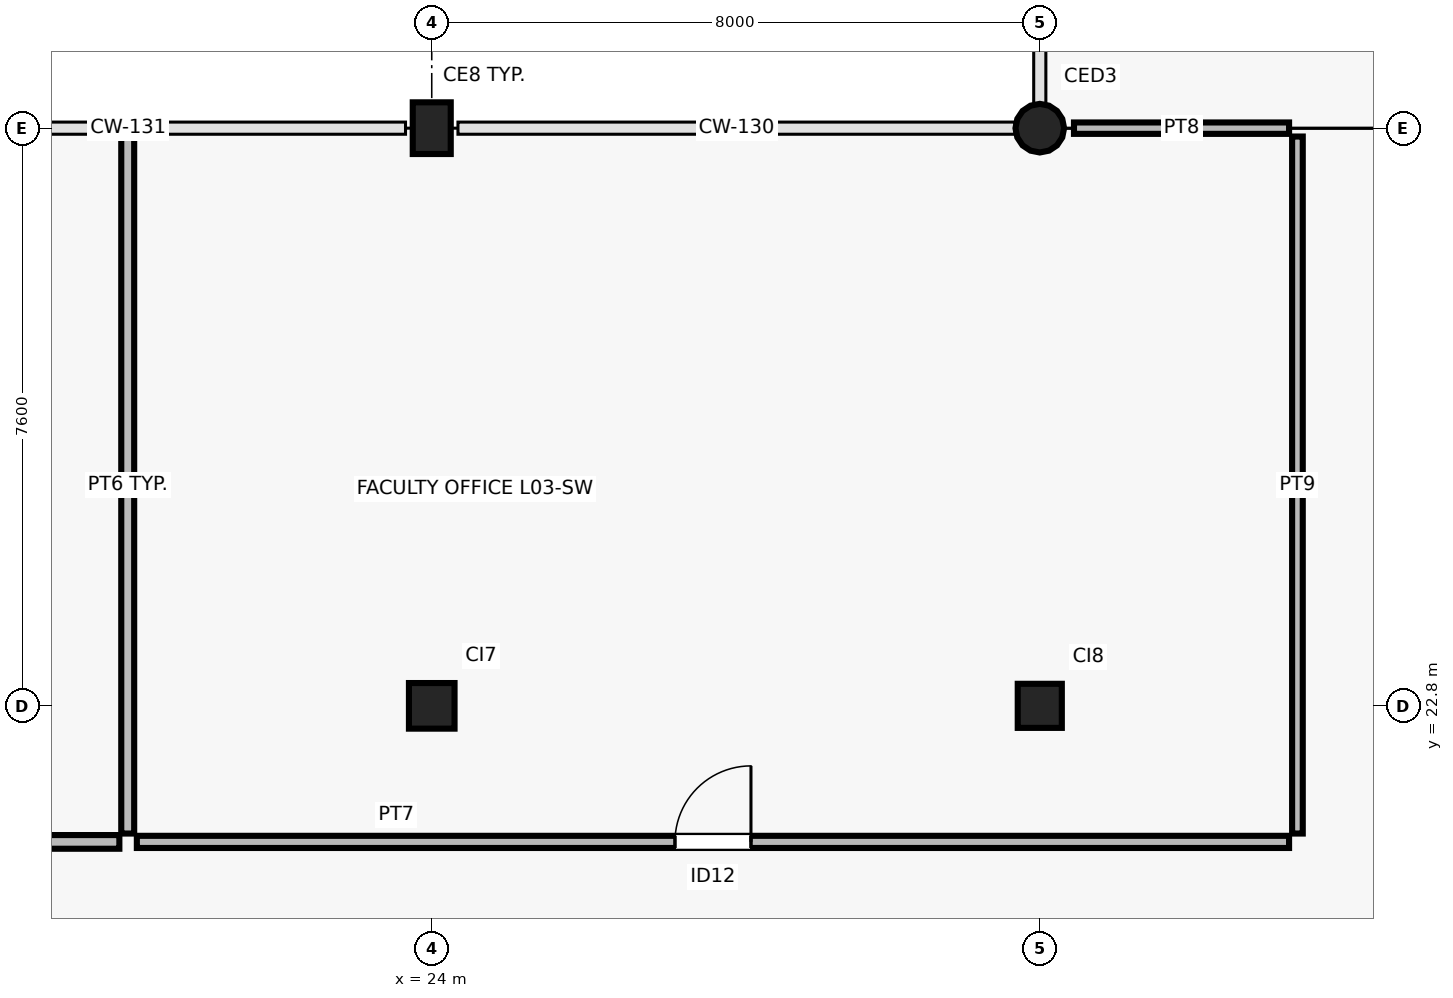
"""IFC4 building model, lengths in metres.
Left out: names, types, materials, properties, quantities, classifications, styles, units other than length and angle.
Written with IfcOpenShell. Run it as: python <this file> out.ifc"""

import sys

from ifc_helpers import new_model, si_unit, direction, frame, frame_2d, origin, origin_2d, place, context, subcontext, project, spatial, rectangle, circle, extrude, element, fill, save


model = new_model("IFC4")
c1 = context("Model", 3, precision=1e-05, world=origin(), true_north=direction((0.0, 1.0)))
c2 = subcontext(c1, "Body", "Model", "MODEL_VIEW")
j1 = project(units=[si_unit("LENGTHUNIT", "METRE"), si_unit("PLANEANGLEUNIT", "RADIAN")], contexts=[c1])
p1 = place(None, origin())
s1 = spatial("IfcSite", under=j1, at=p1, CompositionType="ELEMENT")
p2 = place(p1, origin())
s2 = spatial("IfcBuilding", under=s1, at=p2, CompositionType="ELEMENT")
p3 = place(p2, frame((0.0, 0.0, 13.2)))
s3 = spatial("IfcBuildingStorey", under=s2, at=p3, CompositionType="ELEMENT", Elevation=13.2)
p4 = place(p3, frame((24.0, 22.8, 0.0), z_axis=(0.0, 0.0, 1.0), x_axis=(1.0, 0.0, 0.0)))
e1 = element("IfcColumn", 1, at=p4, inside=s3, PredefinedType="COLUMN", context=c2, shape_type="SweptSolid", body=[
    extrude(rectangle(XDim=0.6, YDim=0.6, at=origin_2d()), origin(), (0.0, 0.0, 1.0), 4.2),
])
p5 = place(p3, frame((24.0, 30.4, 0.0), z_axis=(0.0, 0.0, 1.0), x_axis=(1.0, 0.0, 0.0)))
e2 = element("IfcColumn", 2, at=p5, inside=s3, PredefinedType="COLUMN", context=c2, shape_type="SweptSolid", body=[
    extrude(rectangle(XDim=0.68, YDim=0.5, at=origin_2d()), origin(), (0.0, 0.0, 1.0), 4.2),
])
p6 = place(p3, frame((32.0, 22.8, 0.0), z_axis=(0.0, 0.0, 1.0), x_axis=(1.0, 0.0, 0.0)))
e3 = element("IfcColumn", 3, at=p6, inside=s3, PredefinedType="COLUMN", context=c2, shape_type="SweptSolid", body=[
    extrude(rectangle(XDim=0.58, YDim=0.58, at=origin_2d()), origin(), (0.0, 0.0, 1.0), 4.2),
])
p7 = place(p3, frame((32.0, 30.4, 0.0), z_axis=(0.0, 0.0, 1.0), x_axis=(1.0, 0.0, 0.0)))
e4 = element("IfcColumn", 4, at=p7, inside=s3, PredefinedType="COLUMN", context=c2, shape_type="SweptSolid", body=[
    extrude(circle(Radius=0.32, at=origin_2d()), origin(), (0.0, 0.0, 1.0), 4.2),
])
p8 = place(p3, frame((0.11, 21.01, 0.0), z_axis=(0.0, 0.0, 1.0), x_axis=(1.0, 0.0, 0.0)))
e5 = element("IfcWall", 5, at=p8, inside=s3, PredefinedType="PARTITIONING", context=c2, shape_type="SweptSolid", body=[
    extrude(rectangle(XDim=19.78, YDim=0.18, at=frame_2d((9.89, 0.0))), origin(), (0.0, 0.0, 1.0), 3.9),
])
p9 = place(p8, frame((9.37, 0.0, 0.0)))
e6 = element("IfcOpeningElement", 6, at=p9, cuts=e5, PredefinedType="OPENING", context=c2, shape_type="SweptSolid", body=[
    extrude(rectangle(XDim=1.04, YDim=2.15, at=frame_2d((0.52, 1.075))), frame((0.0, 0.1, 0.0), z_axis=(0.0, -1.0, 0.0), x_axis=(1.0, 0.0, 0.0)), (0.0, 0.0, 1.0), 0.2),
])
p10 = place(p3, frame((20.0, 21.12, 0.0), z_axis=(0.0, 0.0, 1.0), x_axis=(0.0, 1.0, 0.0)))
e7 = element("IfcWall", 7, at=p10, inside=s3, PredefinedType="PARTITIONING", context=c2, shape_type="SweptSolid", body=[
    extrude(rectangle(XDim=9.17, YDim=0.17, at=frame_2d((4.585, 0.0))), origin(), (0.0, 0.0, 1.0), 3.9),
])
p11 = place(p3, frame((20.12, 21.01, 0.0), z_axis=(0.0, 0.0, 1.0), x_axis=(1.0, 0.0, 0.0)))
e8 = element("IfcWall", 8, at=p11, inside=s3, PredefinedType="PARTITIONING", context=c2, shape_type="SweptSolid", body=[
    extrude(rectangle(XDim=15.16, YDim=0.16, at=frame_2d((7.58, 0.0))), origin(), (0.0, 0.0, 1.0), 3.9),
])
p12 = place(p11, frame((7.08, 0.0, 0.0)))
e9 = element("IfcOpeningElement", 9, at=p12, cuts=e8, PredefinedType="OPENING", context=c2, shape_type="SweptSolid", body=[
    extrude(rectangle(XDim=1.0, YDim=2.15, at=frame_2d((0.5, 1.075))), frame((0.0, 0.09, 0.0), z_axis=(0.0, -1.0, 0.0), x_axis=(1.0, 0.0, 0.0)), (0.0, 0.0, 1.0), 0.18),
])
p13 = place(p3, frame((32.45, 30.4, 0.0), z_axis=(0.0, 0.0, 1.0), x_axis=(1.0, 0.0, 0.0)))
e10 = element("IfcWall", 10, at=p13, inside=s3, PredefinedType="PARTITIONING", context=c2, shape_type="SweptSolid", body=[
    extrude(rectangle(XDim=2.83, YDim=0.15, at=frame_2d((1.415, 0.0))), origin(), (0.0, 0.0, 1.0), 3.3),
])
p14 = place(p3, frame((35.39, 21.12, 0.0), z_axis=(0.0, 0.0, 1.0), x_axis=(0.0, 1.0, 0.0)))
e11 = element("IfcWall", 11, at=p14, inside=s3, PredefinedType="PARTITIONING", context=c2, shape_type="SweptSolid", body=[
    extrude(rectangle(XDim=9.17, YDim=0.14, at=frame_2d((4.585, 0.0))), origin(), (0.0, 0.0, 1.0), 3.9),
])
p15 = place(p12, origin())
e12 = element("IfcDoor", 12, at=p15, inside=s3, OperationType="SINGLE_SWING_RIGHT", PredefinedType="DOOR", context=c2, shape_type="SweptSolid", body=[
    extrude(rectangle(XDim=1.0, YDim=2.15, at=frame_2d((0.5, 1.075))), frame((0.0, 0.025, 0.0), z_axis=(0.0, -1.0, 0.0), x_axis=(1.0, 0.0, 0.0)), (0.0, 0.0, 1.0), 0.05),
])
fill(e9, e12)
save(model, sys.argv[1])
